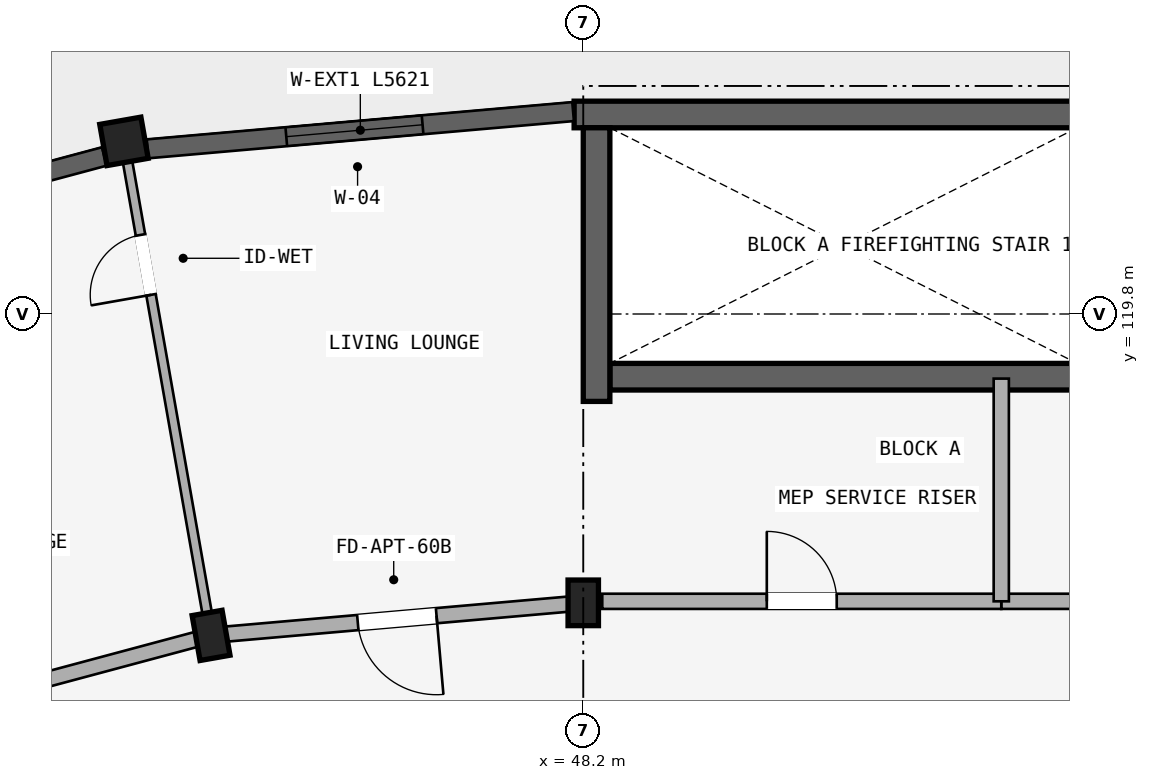
"""IFC4 building model, lengths in metres.
Left out: names, types, materials, properties, quantities, classifications, styles, units other than length and angle.
Written with IfcOpenShell. Run it as: python <this file> out.ifc"""

import sys

from ifc_helpers import new_model, si_unit, direction, frame, frame_2d, origin, origin_2d, place, context, subcontext, project, spatial, rectangle, extrude, element, fill, save


model = new_model("IFC4")
c1 = context("Model", 3, precision=1e-05, world=origin(), true_north=direction((0.0, 1.0)))
c2 = subcontext(c1, "Body", "Model", "MODEL_VIEW")
j1 = project(units=[si_unit("LENGTHUNIT", "METRE"), si_unit("PLANEANGLEUNIT", "RADIAN")], contexts=[c1])
p1 = place(None, origin())
s1 = spatial("IfcSite", under=j1, at=p1, CompositionType="ELEMENT")
p2 = place(p1, origin())
s2 = spatial("IfcBuilding", under=s1, at=p2, CompositionType="ELEMENT")
p3 = place(p2, frame((0.0, 0.0, 49.65)))
s3 = spatial("IfcBuildingStorey", under=s2, at=p3, CompositionType="ELEMENT", Elevation=49.65)
p4 = place(p3, frame((48.08, 122.425, 0.0), z_axis=(0.0, 0.0, 1.0), x_axis=(1.0, 0.0, 0.0)))
e1 = element("IfcWall", 1, at=p4, inside=s3, PredefinedType="SHEAR", context=c2, shape_type="SweptSolid", body=[
    extrude(rectangle(XDim=8.545, YDim=0.35, at=frame_2d((4.272, 0.0))), origin(), (0.0, 0.0, 1.0), 2.91),
])
p5 = place(p3, frame((48.55, 118.975, 0.0), z_axis=(0.0, 0.0, 1.0), x_axis=(1.0, 0.0, 0.0)))
e2 = element("IfcWall", 2, at=p5, inside=s3, PredefinedType="SHEAR", context=c2, shape_type="SweptSolid", body=[
    extrude(rectangle(XDim=8.075, YDim=0.35, at=frame_2d((4.038, 0.0))), origin(), (0.0, 0.0, 1.0), 2.91),
])
p6 = place(p5, frame((6.38, 0.0, 0.0)))
e3 = element("IfcOpeningElement", 3, at=p6, cuts=e2, PredefinedType="OPENING", context=c2, shape_type="SweptSolid", body=[
    extrude(rectangle(XDim=1.24, YDim=2.15, at=frame_2d((0.62, 1.075))), frame((0.0, 0.185, 0.0), z_axis=(0.0, -1.0, 0.0), x_axis=(1.0, 0.0, 0.0)), (0.0, 0.0, 1.0), 0.37),
])
p7 = place(p3, frame((48.375, 118.65, 0.0), z_axis=(0.0, 0.0, 1.0), x_axis=(0.0, 1.0, 0.0)))
e4 = element("IfcWall", 4, at=p7, inside=s3, PredefinedType="SHEAR", context=c2, shape_type="SweptSolid", body=[
    extrude(rectangle(XDim=3.6, YDim=0.35, at=frame_2d((1.8, 0.0))), origin(), (0.0, 0.0, 1.0), 2.91),
])
for number, where, z_axis, x_axis in (
    (5, (48.2, 116.0, 0.0), (0.0, 0.0, 1.0), (1.0, 0.0, 0.0)),
    (6, (43.303, 115.572, 0.0), (0.0, 0.0, 1.0), (0.985, 0.174, 0.0)),
):
    element("IfcColumn", number, at=place(p3, frame(where, z_axis=z_axis, x_axis=x_axis)), inside=s3, PredefinedType="COLUMN", context=c2, shape_type="SweptSolid", body=[
        extrude(rectangle(XDim=0.4, YDim=0.6, at=origin_2d()), origin(), (0.0, 0.0, 1.0), 2.91),
    ])
p8 = place(p3, frame((42.157, 122.071, 0.0), z_axis=(0.0, 0.0, 1.0), x_axis=(0.984807753012, 0.173648177667, 0.0)))
e7 = element("IfcColumn", 7, at=p8, inside=s3, PredefinedType="COLUMN", context=c2, shape_type="SweptSolid", body=[
    extrude(rectangle(XDim=0.55, YDim=0.55, at=origin_2d()), origin(), (0.0, 0.0, 1.0), 2.91),
])
p9 = place(p3, frame((53.7, 116.02, 0.0), z_axis=(0.0, 0.0, 1.0), x_axis=(1.0, 0.0, 0.0)))
e8 = element("IfcWall", 8, at=p9, inside=s3, PredefinedType="STANDARD", context=c2, shape_type="SweptSolid", body=[
    extrude(rectangle(XDim=5.65, YDim=0.2, at=frame_2d((2.825, 0.0))), origin(), (0.0, 0.0, 1.0), 2.352),
])
p10 = place(p9, frame((1.923, 0.0, 0.0)))
e9 = element("IfcOpeningElement", 9, at=p10, cuts=e8, PredefinedType="OPENING", context=c2, shape_type="SweptSolid", body=[
    extrude(rectangle(XDim=1.24, YDim=2.15, at=frame_2d((0.62, 1.075))), frame((0.0, 0.11, 0.0), z_axis=(0.0, -1.0, 0.0), x_axis=(1.0, 0.0, 0.0)), (0.0, 0.0, 1.0), 0.22),
])
p11 = place(p3, frame((48.45, 116.02, 0.0), z_axis=(0.0, 0.0, 1.0), x_axis=(1.0, 0.0, 0.0)))
e10 = element("IfcWall", 10, at=p11, inside=s3, PredefinedType="STANDARD", context=c2, shape_type="SweptSolid", body=[
    extrude(rectangle(XDim=5.25, YDim=0.2, at=frame_2d((2.625, 0.0))), origin(), (0.0, 0.0, 1.0), 2.352),
])
p12 = place(p11, frame((2.165, 0.0, 0.0)))
e11 = element("IfcOpeningElement", 11, at=p12, cuts=e10, PredefinedType="OPENING", context=c2, shape_type="SweptSolid", body=[
    extrude(rectangle(XDim=0.92, YDim=2.1, at=frame_2d((0.46, 1.05))), frame((0.0, 0.11, 0.0), z_axis=(0.0, -1.0, 0.0), x_axis=(1.0, 0.0, 0.0)), (0.0, 0.0, 1.0), 0.22),
])
p13 = place(p3, frame((53.7, 116.02, 0.0), z_axis=(0.0, 0.0, 1.0), x_axis=(0.0, 1.0, 0.0)))
e12 = element("IfcWall", 12, at=p13, inside=s3, PredefinedType="STANDARD", context=c2, shape_type="SweptSolid", body=[
    extrude(rectangle(XDim=2.93, YDim=0.2, at=frame_2d((1.465, 0.0))), origin(), (0.0, 0.0, 1.0), 2.352),
])
p14 = place(p3, frame((48.2, 116.0, 0.0), z_axis=(0.0, 0.0, 1.0), x_axis=(-0.996193663584, -0.087167566415, 0.0)))
e13 = element("IfcWall", 13, at=p14, inside=s3, PredefinedType="STANDARD", context=c2, shape_type="SweptSolid", body=[
    extrude(rectangle(XDim=4.916, YDim=0.2, at=frame_2d((2.458, 0.0))), origin(), (0.0, 0.0, 1.0), 2.352),
])
p15 = place(p14, frame((1.938, 0.0, 0.0)))
e14 = element("IfcOpeningElement", 14, at=p15, cuts=e13, PredefinedType="OPENING", context=c2, shape_type="SweptSolid", body=[
    extrude(rectangle(XDim=1.04, YDim=2.15, at=frame_2d((0.52, 1.075))), frame((0.0, 0.11, 0.0), z_axis=(0.0, -1.0, 0.0), x_axis=(1.0, 0.0, 0.0)), (0.0, 0.0, 1.0), 0.22),
])
p16 = place(p3, frame((43.303, 115.572, 0.0), z_axis=(0.0, 0.0, 1.0), x_axis=(-0.965930095386, -0.258803112091, 0.0)))
e15 = element("IfcWall", 15, at=p16, inside=s3, PredefinedType="STANDARD", context=c2, shape_type="SweptSolid", body=[
    extrude(rectangle(XDim=4.916, YDim=0.2, at=frame_2d((2.458, 0.0))), origin(), (0.0, 0.0, 1.0), 2.352),
])
p17 = place(p3, frame((43.286, 115.67, 0.0), z_axis=(0.0, 0.0, 1.0), x_axis=(-0.173646504755, 0.98480804799, 0.0)))
e16 = element("IfcWall", 16, at=p17, inside=s3, PredefinedType="PARTITIONING", context=c2, shape_type="SweptSolid", body=[
    extrude(rectangle(XDim=6.22, YDim=0.125, at=frame_2d((3.11, 0.0))), origin(), (0.0, 0.0, 1.0), 2.352),
])
p18 = place(p17, frame((4.45, 0.0, 0.0)))
e17 = element("IfcOpeningElement", 17, at=p18, cuts=e16, PredefinedType="OPENING", context=c2, shape_type="SweptSolid", body=[
    extrude(rectangle(XDim=0.8, YDim=2.1, at=frame_2d((0.4, 1.05))), frame((0.0, 0.073, 0.0), z_axis=(0.0, -1.0, 0.0), x_axis=(1.0, 0.0, 0.0)), (0.0, 0.0, 1.0), 0.145),
])
p19 = place(p3, frame((48.066, 122.463, 0.0), z_axis=(0.0, 0.0, 1.0), x_axis=(-0.996192680155, -0.087178804791, 0.0)))
e18 = element("IfcWall", 18, at=p19, inside=s3, PredefinedType="STANDARD", context=c2, shape_type="SweptSolid", body=[
    extrude(rectangle(XDim=5.621, YDim=0.25, at=frame_2d((2.81, 0.0))), origin(), (0.0, 0.0, 1.0), 2.352),
])
p20 = place(p19, frame((1.988, 0.0, 0.502)))
e19 = element("IfcOpeningElement", 19, at=p20, cuts=e18, PredefinedType="OPENING", context=c2, shape_type="SweptSolid", body=[
    extrude(rectangle(XDim=1.8, YDim=1.65, at=frame_2d((0.9, 0.825))), frame((0.0, 0.135, 0.0), z_axis=(0.0, -1.0, 0.0), x_axis=(1.0, 0.0, 0.0)), (0.0, 0.0, 1.0), 0.27),
])
p21 = place(p3, frame((41.899, 121.873, 0.0), z_axis=(0.0, 0.0, 1.0), x_axis=(-0.965921330231, -0.258835824038, 0.0)))
e20 = element("IfcWall", 20, at=p21, inside=s3, PredefinedType="STANDARD", context=c2, shape_type="SweptSolid", body=[
    extrude(rectangle(XDim=5.465, YDim=0.25, at=frame_2d((2.732, 0.0))), origin(), (0.0, 0.0, 1.0), 2.352),
])
p22 = place(p21, frame((3.432, 0.0, 0.402)))
e21 = element("IfcOpeningElement", 21, at=p22, cuts=e20, PredefinedType="OPENING", context=c2, shape_type="SweptSolid", body=[
    extrude(rectangle(XDim=1.2, YDim=1.5, at=frame_2d((0.6, 0.75))), frame((0.0, 0.135, 0.0), z_axis=(0.0, -1.0, 0.0), x_axis=(1.0, 0.0, 0.0)), (0.0, 0.0, 1.0), 0.27),
])
p23 = place(p21, frame((1.283, 0.0, 0.0)))
e22 = element("IfcOpeningElement", 22, at=p23, cuts=e20, PredefinedType="OPENING", context=c2, shape_type="SweptSolid", body=[
    extrude(rectangle(XDim=1.26, YDim=2.15, at=frame_2d((0.63, 1.075))), frame((0.0, 0.135, 0.0), z_axis=(0.0, -1.0, 0.0), x_axis=(1.0, 0.0, 0.0)), (0.0, 0.0, 1.0), 0.27),
])
p24 = place(p20, origin())
e23 = element("IfcWindow", 23, at=p24, inside=s3, PartitioningType="DOUBLE_PANEL_VERTICAL", PredefinedType="WINDOW", context=c2, shape_type="SweptSolid", body=[
    extrude(rectangle(XDim=1.8, YDim=1.65, at=frame_2d((0.9, 0.825))), frame((0.0, 0.03, 0.0), z_axis=(0.0, -1.0, 0.0), x_axis=(1.0, 0.0, 0.0)), (0.0, 0.0, 1.0), 0.06),
])
fill(e19, e23)
p25 = place(p12, frame((0.92, 0.0, 0.0), z_axis=(0.0, 0.0, 1.0), x_axis=(-1.0, 0.0, 0.0)))
e24 = element("IfcDoor", 24, at=p25, inside=s3, OperationType="SINGLE_SWING_RIGHT", PredefinedType="DOOR", context=c2, shape_type="SweptSolid", body=[
    extrude(rectangle(XDim=0.92, YDim=2.1, at=frame_2d((0.46, 1.05))), frame((0.0, 0.025, 0.0), z_axis=(0.0, -1.0, 0.0), x_axis=(1.0, 0.0, 0.0)), (0.0, 0.0, 1.0), 0.05),
])
fill(e11, e24)
p26 = place(p18, origin())
e25 = element("IfcDoor", 25, at=p26, inside=s3, OperationType="SINGLE_SWING_LEFT", PredefinedType="DOOR", context=c2, shape_type="SweptSolid", body=[
    extrude(rectangle(XDim=0.8, YDim=2.1, at=frame_2d((0.4, 1.05))), frame((0.0, 0.025, 0.0), z_axis=(0.0, -1.0, 0.0), x_axis=(1.0, 0.0, 0.0)), (0.0, 0.0, 1.0), 0.05),
])
fill(e17, e25)
p27 = place(p15, origin())
e26 = element("IfcDoor", 26, at=p27, inside=s3, OperationType="SINGLE_SWING_LEFT", PredefinedType="DOOR", context=c2, shape_type="SweptSolid", body=[
    extrude(rectangle(XDim=1.04, YDim=2.15, at=frame_2d((0.52, 1.075))), frame((0.0, 0.025, 0.0), z_axis=(0.0, -1.0, 0.0), x_axis=(1.0, 0.0, 0.0)), (0.0, 0.0, 1.0), 0.05),
])
fill(e14, e26)
save(model, sys.argv[1])
